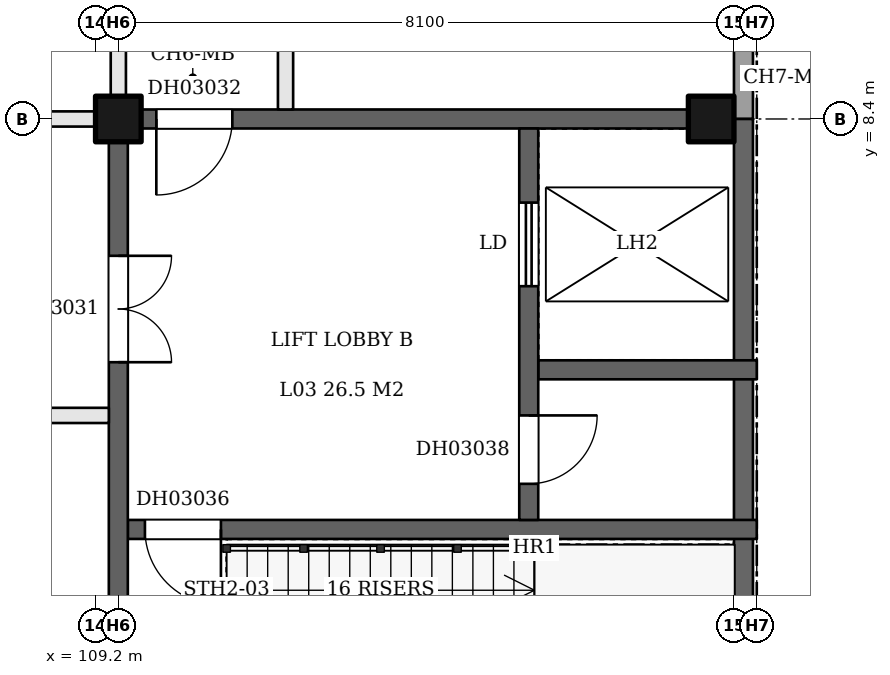
"""IFC4 building model, lengths in metres.
Left out: names, types, materials, properties, quantities, classifications, styles, units other than length and angle.
Written with IfcOpenShell. Run it as: python <this file> out.ifc"""

import sys

from ifc_helpers import new_model, si_unit, direction, frame, frame_2d, origin, origin_2d, place, context, subcontext, project, spatial, rectangle, extrude, element, fill, save


model = new_model("IFC4")
c1 = context("Model", 3, precision=1e-05, world=origin(), true_north=direction((0.0, 1.0)))
c2 = subcontext(c1, "Body", "Model", "MODEL_VIEW")
j1 = project(units=[si_unit("LENGTHUNIT", "METRE"), si_unit("PLANEANGLEUNIT", "RADIAN")], contexts=[c1])
p1 = place(None, origin())
s1 = spatial("IfcSite", under=j1, at=p1, CompositionType="ELEMENT")
p2 = place(p1, origin())
s2 = spatial("IfcBuilding", under=s1, at=p2, CompositionType="ELEMENT")
p3 = place(p2, frame((0.0, 0.0, 19.8)))
s3 = spatial("IfcBuildingStorey", under=s2, at=p3, CompositionType="ELEMENT", Elevation=19.8)
for number, where, z_axis, x_axis in (
    (1, (109.5, 8.4, 0.0), (0.0, 0.0, 1.0), (1.0, 0.0, 0.0)),
    (2, (117.3, 8.4, 0.0), (0.0, 0.0, 1.0), (1.0, 0.0, 0.0)),
):
    element("IfcColumn", number, at=place(p3, frame(where, z_axis=z_axis, x_axis=x_axis)), inside=s3, PredefinedType="COLUMN", context=c2, shape_type="SweptSolid", body=[
        extrude(rectangle(XDim=0.6, YDim=0.6, at=origin_2d()), origin(), (0.0, 0.0, 1.0), 5.0),
    ])
p4 = place(p3, frame((109.625, 3.0, 0.0), z_axis=(0.0, 0.0, 1.0), x_axis=(1.0, 0.0, 0.0)))
e3 = element("IfcWall", 3, at=p4, inside=s3, PredefinedType="SHEAR", context=c2, shape_type="SweptSolid", body=[
    extrude(rectangle(XDim=8.275, YDim=0.25, at=frame_2d((4.137, 0.0))), origin(), (0.0, 0.0, 1.0), 5.0),
])
p5 = place(p4, frame((0.225, 0.0, 0.0)))
e4 = element("IfcOpeningElement", 4, at=p5, cuts=e3, PredefinedType="OPENING", context=c2, shape_type="SweptSolid", body=[
    extrude(rectangle(XDim=1.0, YDim=2.1, at=frame_2d((0.5, 1.05))), frame((0.0, 0.135, 0.0), z_axis=(0.0, -1.0, 0.0), x_axis=(1.0, 0.0, 0.0)), (0.0, 0.0, 1.0), 0.27),
])
p6 = place(p3, frame((68.4, 4.5, 0.0), z_axis=(0.0, 0.0, 1.0), x_axis=(1.0, 0.0, 0.0)))
e5 = element("IfcWall", 5, at=p6, inside=s3, PredefinedType="PARTITIONING", context=c2, shape_type="SweptSolid", body=[
    extrude(rectangle(XDim=40.975, YDim=0.2, at=frame_2d((20.488, 0.0))), origin(), (0.0, 0.0, 1.0), 5.0),
])
p7 = place(p6, frame((1.6, 0.0, 0.0)))
e6 = element("IfcOpeningElement", 6, at=p7, cuts=e5, PredefinedType="OPENING", context=c2, shape_type="SweptSolid", body=[
    extrude(rectangle(XDim=1.0, YDim=2.1, at=frame_2d((0.5, 1.05))), frame((0.0, 0.11, 0.0), z_axis=(0.0, -1.0, 0.0), x_axis=(1.0, 0.0, 0.0)), (0.0, 0.0, 1.0), 0.22),
])
p8 = place(p6, frame((7.6, 0.0, 0.0)))
e7 = element("IfcOpeningElement", 7, at=p8, cuts=e5, PredefinedType="OPENING", context=c2, shape_type="SweptSolid", body=[
    extrude(rectangle(XDim=1.0, YDim=2.1, at=frame_2d((0.5, 1.05))), frame((0.0, 0.11, 0.0), z_axis=(0.0, -1.0, 0.0), x_axis=(1.0, 0.0, 0.0)), (0.0, 0.0, 1.0), 0.22),
])
p9 = place(p6, frame((13.6, 0.0, 0.0)))
e8 = element("IfcOpeningElement", 8, at=p9, cuts=e5, PredefinedType="OPENING", context=c2, shape_type="SweptSolid", body=[
    extrude(rectangle(XDim=1.0, YDim=2.1, at=frame_2d((0.5, 1.05))), frame((0.0, 0.11, 0.0), z_axis=(0.0, -1.0, 0.0), x_axis=(1.0, 0.0, 0.0)), (0.0, 0.0, 1.0), 0.22),
])
p10 = place(p6, frame((19.6, 0.0, 0.0)))
e9 = element("IfcOpeningElement", 9, at=p10, cuts=e5, PredefinedType="OPENING", context=c2, shape_type="SweptSolid", body=[
    extrude(rectangle(XDim=1.0, YDim=2.1, at=frame_2d((0.5, 1.05))), frame((0.0, 0.11, 0.0), z_axis=(0.0, -1.0, 0.0), x_axis=(1.0, 0.0, 0.0)), (0.0, 0.0, 1.0), 0.22),
])
p11 = place(p6, frame((25.6, 0.0, 0.0)))
e10 = element("IfcOpeningElement", 10, at=p11, cuts=e5, PredefinedType="OPENING", context=c2, shape_type="SweptSolid", body=[
    extrude(rectangle(XDim=1.0, YDim=2.1, at=frame_2d((0.5, 1.05))), frame((0.0, 0.11, 0.0), z_axis=(0.0, -1.0, 0.0), x_axis=(1.0, 0.0, 0.0)), (0.0, 0.0, 1.0), 0.22),
])
p12 = place(p6, frame((31.6, 0.0, 0.0)))
e11 = element("IfcOpeningElement", 11, at=p12, cuts=e5, PredefinedType="OPENING", context=c2, shape_type="SweptSolid", body=[
    extrude(rectangle(XDim=1.0, YDim=2.1, at=frame_2d((0.5, 1.05))), frame((0.0, 0.11, 0.0), z_axis=(0.0, -1.0, 0.0), x_axis=(1.0, 0.0, 0.0)), (0.0, 0.0, 1.0), 0.22),
])
p13 = place(p6, frame((37.6, 0.0, 0.0)))
e12 = element("IfcOpeningElement", 12, at=p13, cuts=e5, PredefinedType="OPENING", context=c2, shape_type="SweptSolid", body=[
    extrude(rectangle(XDim=1.0, YDim=2.1, at=frame_2d((0.5, 1.05))), frame((0.0, 0.11, 0.0), z_axis=(0.0, -1.0, 0.0), x_axis=(1.0, 0.0, 0.0)), (0.0, 0.0, 1.0), 0.22),
])
p14 = place(p3, frame((115.025, 5.1, 0.0), z_axis=(0.0, 0.0, 1.0), x_axis=(1.0, 0.0, 0.0)))
e13 = element("IfcWall", 13, at=p14, inside=s3, PredefinedType="SHEAR", context=c2, shape_type="SweptSolid", body=[
    extrude(rectangle(XDim=2.875, YDim=0.25, at=frame_2d((1.438, 0.0))), origin(), (0.0, 0.0, 1.0), 5.0),
])
p15 = place(p3, frame((101.4, 8.4, 0.0), z_axis=(0.0, 0.0, 1.0), x_axis=(1.0, 0.0, 0.0)))
e14 = element("IfcWall", 14, at=p15, inside=s3, PredefinedType="PARTITIONING", context=c2, shape_type="SweptSolid", body=[
    extrude(rectangle(XDim=7.8, YDim=0.2, at=frame_2d((3.9, 0.0))), origin(), (0.0, 0.0, 1.0), 5.0),
])
p16 = place(p15, frame((2.2, 0.0, 0.0)))
e15 = element("IfcOpeningElement", 15, at=p16, cuts=e14, PredefinedType="OPENING", context=c2, shape_type="SweptSolid", body=[
    extrude(rectangle(XDim=1.0, YDim=2.1, at=frame_2d((0.5, 1.05))), frame((0.0, 0.11, 0.0), z_axis=(0.0, -1.0, 0.0), x_axis=(1.0, 0.0, 0.0)), (0.0, 0.0, 1.0), 0.22),
])
p17 = place(p15, frame((5.2, 0.0, 0.0)))
e16 = element("IfcOpeningElement", 16, at=p17, cuts=e14, PredefinedType="OPENING", context=c2, shape_type="SweptSolid", body=[
    extrude(rectangle(XDim=1.0, YDim=2.1, at=frame_2d((0.5, 1.05))), frame((0.0, 0.11, 0.0), z_axis=(0.0, -1.0, 0.0), x_axis=(1.0, 0.0, 0.0)), (0.0, 0.0, 1.0), 0.22),
])
p18 = place(p3, frame((109.8, 8.4, 0.0), z_axis=(0.0, 0.0, 1.0), x_axis=(1.0, 0.0, 0.0)))
e17 = element("IfcWall", 17, at=p18, inside=s3, PredefinedType="SHEAR", context=c2, shape_type="SweptSolid", body=[
    extrude(rectangle(XDim=7.2, YDim=0.25, at=frame_2d((3.6, 0.0))), origin(), (0.0, 0.0, 1.0), 5.0),
])
p19 = place(p18, frame((0.2, 0.0, 0.0)))
e18 = element("IfcOpeningElement", 18, at=p19, cuts=e17, PredefinedType="OPENING", context=c2, shape_type="SweptSolid", body=[
    extrude(rectangle(XDim=1.0, YDim=2.1, at=frame_2d((0.5, 1.05))), frame((0.0, 0.135, 0.0), z_axis=(0.0, -1.0, 0.0), x_axis=(1.0, 0.0, 0.0)), (0.0, 0.0, 1.0), 0.27),
])
p20 = place(p3, frame((109.5, 0.9, 0.0), z_axis=(0.0, 0.0, 1.0), x_axis=(0.0, 1.0, 0.0)))
e19 = element("IfcWall", 19, at=p20, inside=s3, PredefinedType="SHEAR", context=c2, shape_type="SweptSolid", body=[
    extrude(rectangle(XDim=7.2, YDim=0.25, at=frame_2d((3.6, 0.0))), origin(), (0.0, 0.0, 1.0), 5.0),
])
p21 = place(p20, frame((4.3, 0.0, 0.0)))
e20 = element("IfcOpeningElement", 20, at=p21, cuts=e19, PredefinedType="OPENING", context=c2, shape_type="SweptSolid", body=[
    extrude(rectangle(XDim=1.4, YDim=2.1, at=frame_2d((0.7, 1.05))), frame((0.0, 0.135, 0.0), z_axis=(0.0, -1.0, 0.0), x_axis=(1.0, 0.0, 0.0)), (0.0, 0.0, 1.0), 0.27),
])
p22 = place(p3, frame((109.5, 8.7, 0.0), z_axis=(0.0, 0.0, 1.0), x_axis=(0.0, 1.0, 0.0)))
e21 = element("IfcWall", 21, at=p22, inside=s3, PredefinedType="PARTITIONING", context=c2, shape_type="SweptSolid", body=[
    extrude(rectangle(XDim=7.8, YDim=0.2, at=frame_2d((3.9, 0.0))), origin(), (0.0, 0.0, 1.0), 5.0),
])
p23 = place(p3, frame((111.7, 8.525, 0.0), z_axis=(0.0, 0.0, 1.0), x_axis=(0.0, 1.0, 0.0)))
e22 = element("IfcWall", 22, at=p23, inside=s3, PredefinedType="PARTITIONING", context=c2, shape_type="SweptSolid", body=[
    extrude(rectangle(XDim=16.675, YDim=0.2, at=frame_2d((8.337, 0.0))), origin(), (0.0, 0.0, 1.0), 5.0),
])
p24 = place(p23, frame((3.637, 0.0, 0.0)))
e23 = element("IfcOpeningElement", 23, at=p24, cuts=e22, PredefinedType="OPENING", context=c2, shape_type="SweptSolid", body=[
    extrude(rectangle(XDim=1.0, YDim=2.1, at=frame_2d((0.5, 1.05))), frame((0.0, 0.11, 0.0), z_axis=(0.0, -1.0, 0.0), x_axis=(1.0, 0.0, 0.0)), (0.0, 0.0, 1.0), 0.22),
])
p25 = place(p23, frame((11.975, 0.0, 0.0)))
e24 = element("IfcOpeningElement", 24, at=p25, cuts=e22, PredefinedType="OPENING", context=c2, shape_type="SweptSolid", body=[
    extrude(rectangle(XDim=1.0, YDim=2.1, at=frame_2d((0.5, 1.05))), frame((0.0, 0.11, 0.0), z_axis=(0.0, -1.0, 0.0), x_axis=(1.0, 0.0, 0.0)), (0.0, 0.0, 1.0), 0.22),
])
p26 = place(p3, frame((114.9, 3.125, 0.0), z_axis=(0.0, 0.0, 1.0), x_axis=(0.0, 1.0, 0.0)))
e25 = element("IfcWall", 25, at=p26, inside=s3, PredefinedType="SHEAR", context=c2, shape_type="SweptSolid", body=[
    extrude(rectangle(XDim=5.15, YDim=0.25, at=frame_2d((2.575, 0.0))), origin(), (0.0, 0.0, 1.0), 5.0),
])
p27 = place(p26, frame((3.075, 0.0, 0.0)))
e26 = element("IfcOpeningElement", 26, at=p27, cuts=e25, PredefinedType="OPENING", context=c2, shape_type="SweptSolid", body=[
    extrude(rectangle(XDim=1.1, YDim=2.1, at=frame_2d((0.55, 1.05))), frame((0.0, 0.135, 0.0), z_axis=(0.0, -1.0, 0.0), x_axis=(1.0, 0.0, 0.0)), (0.0, 0.0, 1.0), 0.27),
])
p28 = place(p26, frame((0.475, 0.0, 0.0)))
e27 = element("IfcOpeningElement", 27, at=p28, cuts=e25, PredefinedType="OPENING", context=c2, shape_type="SweptSolid", body=[
    extrude(rectangle(XDim=0.9, YDim=2.1, at=frame_2d((0.45, 1.05))), frame((0.0, 0.135, 0.0), z_axis=(0.0, -1.0, 0.0), x_axis=(1.0, 0.0, 0.0)), (0.0, 0.0, 1.0), 0.27),
])
p29 = place(p3, frame((117.725, 0.05, 0.0), z_axis=(0.0, 0.0, 1.0), x_axis=(0.0, 1.0, 0.0)))
e28 = element("IfcWall", 28, at=p29, inside=s3, PredefinedType="SHEAR", context=c2, shape_type="SweptSolid", body=[
    extrude(rectangle(XDim=8.35, YDim=0.25, at=frame_2d((4.175, 0.0))), origin(), (0.0, 0.0, 1.0), 5.0),
])
p30 = place(p3, frame((117.725, 8.4, 0.0), z_axis=(0.0, 0.0, 1.0), x_axis=(0.0, 1.0, 0.0)))
e29 = element("IfcWall", 29, at=p30, inside=s3, PredefinedType="SOLIDWALL", context=c2, shape_type="SweptSolid", body=[
    extrude(rectangle(XDim=16.8, YDim=0.25, at=frame_2d((8.4, 0.0))), origin(), (0.0, 0.0, 1.0), 5.0),
])
p31 = place(p21, frame((1.4, 0.0, 0.0), z_axis=(0.0, 0.0, 1.0), x_axis=(-1.0, 0.0, 0.0)))
e30 = element("IfcDoor", 30, at=p31, inside=s3, OperationType="DOUBLE_DOOR_SINGLE_SWING", PredefinedType="DOOR", context=c2, shape_type="SweptSolid", body=[
    extrude(rectangle(XDim=1.4, YDim=2.1, at=frame_2d((0.7, 1.05))), frame((0.0, 0.025, 0.0), z_axis=(0.0, -1.0, 0.0), x_axis=(1.0, 0.0, 0.0)), (0.0, 0.0, 1.0), 0.05),
])
fill(e20, e30)
p32 = place(p19, frame((1.0, 0.0, 0.0), z_axis=(0.0, 0.0, 1.0), x_axis=(-1.0, 0.0, 0.0)))
e31 = element("IfcDoor", 31, at=p32, inside=s3, OperationType="SINGLE_SWING_RIGHT", PredefinedType="DOOR", context=c2, shape_type="SweptSolid", body=[
    extrude(rectangle(XDim=1.0, YDim=2.1, at=frame_2d((0.5, 1.05))), frame((0.0, 0.025, 0.0), z_axis=(0.0, -1.0, 0.0), x_axis=(1.0, 0.0, 0.0)), (0.0, 0.0, 1.0), 0.05),
])
fill(e18, e31)
p33 = place(p5, frame((1.0, 0.0, 0.0), z_axis=(0.0, 0.0, 1.0), x_axis=(-1.0, 0.0, 0.0)))
e32 = element("IfcDoor", 32, at=p33, inside=s3, OperationType="SINGLE_SWING_LEFT", PredefinedType="DOOR", context=c2, shape_type="SweptSolid", body=[
    extrude(rectangle(XDim=1.0, YDim=2.1, at=frame_2d((0.5, 1.05))), frame((0.0, 0.025, 0.0), z_axis=(0.0, -1.0, 0.0), x_axis=(1.0, 0.0, 0.0)), (0.0, 0.0, 1.0), 0.05),
])
fill(e4, e32)
p34 = place(p27, origin())
e33 = element("IfcDoor", 33, at=p34, inside=s3, OperationType="SLIDING_TO_LEFT", PredefinedType="DOOR", context=c2, shape_type="SweptSolid", body=[
    extrude(rectangle(XDim=1.1, YDim=2.1, at=frame_2d((0.55, 1.05))), frame((0.0, 0.025, 0.0), z_axis=(0.0, -1.0, 0.0), x_axis=(1.0, 0.0, 0.0)), (0.0, 0.0, 1.0), 0.05),
])
fill(e26, e33)
p35 = place(p28, frame((0.9, 0.0, 0.0), z_axis=(0.0, 0.0, 1.0), x_axis=(-1.0, 0.0, 0.0)))
e34 = element("IfcDoor", 34, at=p35, inside=s3, OperationType="SINGLE_SWING_LEFT", PredefinedType="DOOR", context=c2, shape_type="SweptSolid", body=[
    extrude(rectangle(XDim=0.9, YDim=2.1, at=frame_2d((0.45, 1.05))), frame((0.0, 0.025, 0.0), z_axis=(0.0, -1.0, 0.0), x_axis=(1.0, 0.0, 0.0)), (0.0, 0.0, 1.0), 0.05),
])
fill(e27, e34)
save(model, sys.argv[1])
